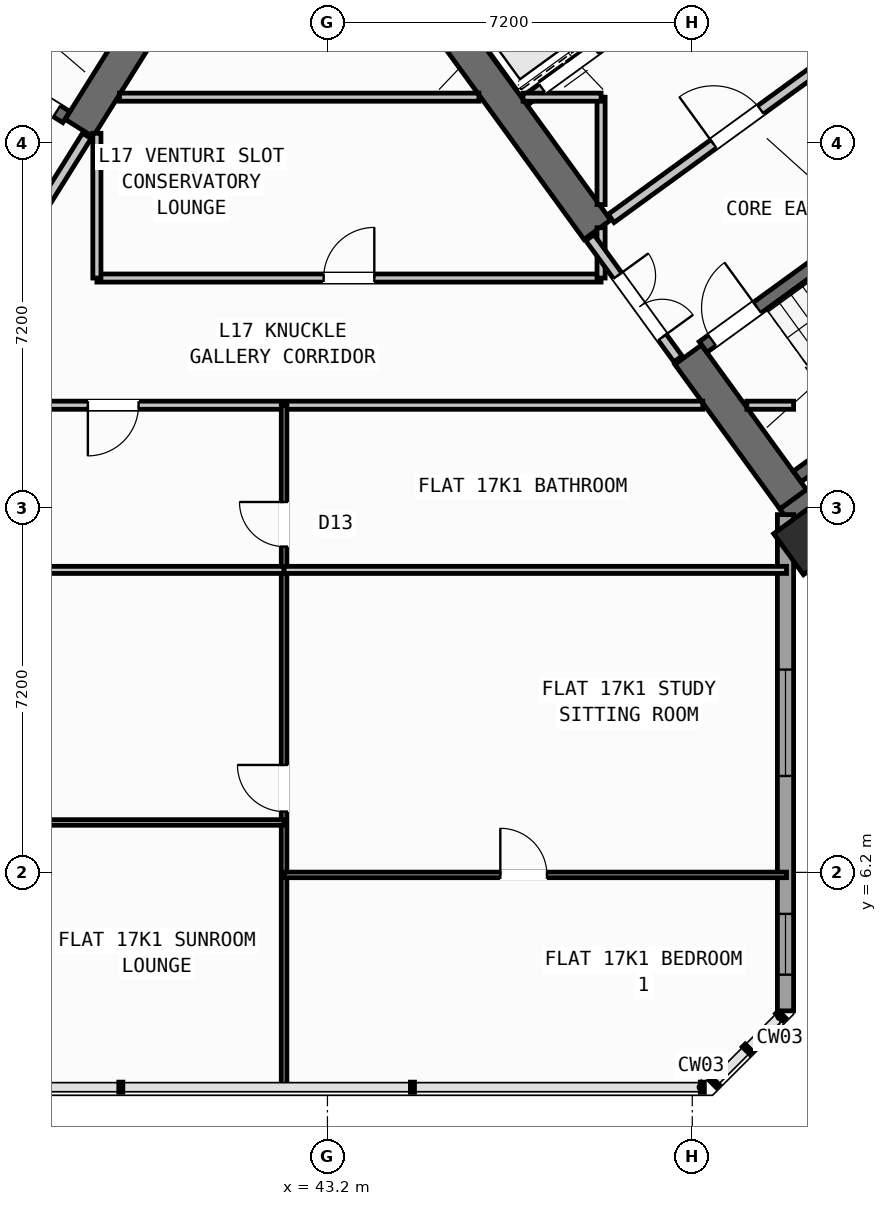
"""IFC4 building model, lengths in metres.
Left out: names, types, materials, properties, quantities, classifications, styles, units other than length and angle.
Written with IfcOpenShell. Run it as: python <this file> out.ifc"""

import sys

from ifc_helpers import new_model, si_unit, direction, frame, frame_2d, origin, origin_2d, place, context, subcontext, project, spatial, rectangle, hollow_rectangle, extrude, source, transform, mapped, element, fill, save


model = new_model("IFC4")
c1 = context("Model", 3, precision=1e-05, world=origin(), true_north=direction((0.0, 1.0)))
c2 = subcontext(c1, "Body", "Model", "MODEL_VIEW")
j1 = project(units=[si_unit("LENGTHUNIT", "METRE"), si_unit("PLANEANGLEUNIT", "RADIAN")], contexts=[c1])
p1 = place(None, origin())
s1 = spatial("IfcSite", under=j1, at=p1, CompositionType="ELEMENT")
p2 = place(p1, origin())
s2 = spatial("IfcBuilding", under=s1, at=p2, CompositionType="ELEMENT")
p3 = place(p2, frame((0.0, 0.0, 67.2)))
s3 = spatial("IfcBuildingStorey", under=s2, at=p3, CompositionType="ELEMENT", Elevation=67.2)
p4 = place(p3, frame((40.168, 23.88, 0.0), z_axis=(0.0, 0.0, 1.0), x_axis=(-0.529893103397, -0.8480644427, 0.0)))
e1 = element("IfcWall", 1, at=p4, inside=s3, PredefinedType="SHEAR", context=c2, shape_type="SweptSolid", body=[
    extrude(rectangle(XDim=3.525, YDim=0.65, at=frame_2d((1.763, 0.0))), origin(), (0.0, 0.0, 1.0), 4.22),
])
p5 = place(p3, frame((52.318, 13.11, 0.0), z_axis=(0.0, 0.0, 1.0), x_axis=(0.809019445368, 0.587781878776, 0.0)))
e2 = element("IfcWall", 2, at=p5, inside=s3, PredefinedType="SHEAR", context=c2, shape_type="SweptSolid", body=[
    extrude(rectangle(XDim=12.44, YDim=0.65, at=frame_2d((6.22, 0.0))), origin(), (0.0, 0.0, 1.0), 4.22),
])
p6 = place(p3, frame((52.39, 13.564, 0.0), z_axis=(0.0, 0.0, 1.0), x_axis=(-0.58779688989, 0.809008539037, 0.0)))
e3 = element("IfcWall", 3, at=p6, inside=s3, PredefinedType="SHEAR", context=c2, shape_type="SweptSolid", body=[
    extrude(rectangle(XDim=3.525, YDim=0.65, at=frame_2d((1.763, 0.0))), origin(), (0.0, 0.0, 1.0), 4.22),
])
p7 = place(p3, frame((48.526, 18.884, 0.0), z_axis=(0.0, 0.0, 1.0), x_axis=(-0.58777996584, 0.809020835181, 0.0)))
e4 = element("IfcWall", 4, at=p7, inside=s3, PredefinedType="SHEAR", context=c2, shape_type="SweptSolid", body=[
    extrude(rectangle(XDim=6.375, YDim=0.65, at=frame_2d((3.188, 0.0))), origin(), (0.0, 0.0, 1.0), 4.22),
])
m1 = source(origin(), c2, "Body", "SweptSolid", [
    extrude(hollow_rectangle(XDim=1.0, YDim=1.0, WallThickness=0.04, at=origin_2d()), origin(), (0.0, 0.0, 1.0), 4.5),
])
p8 = place(p3, frame((52.705, 12.773, 0.0), z_axis=(0.0, 0.0, 1.0), x_axis=(0.809016994375, 0.587785252292, 0.0)))
e5 = element("IfcColumn", 5, at=p8, inside=s3, PredefinedType="COLUMN", context=c2, shape_type="MappedRepresentation", body=[
    mapped(m1, transform((0.0, 0.0, 0.0), scale=1.0)),
])
p9 = place(p3, frame((56.581, 7.439, 0.0), z_axis=(0.0, 0.0, 1.0), x_axis=(-0.587785875463, 0.809016541614, 0.0)))
e6 = element("IfcWall", 6, at=p9, inside=s3, PredefinedType="STANDARD", context=c2, shape_type="SweptSolid", body=[
    extrude(rectangle(XDim=6.774, YDim=0.32, at=frame_2d((3.387, 0.0))), origin(), (0.0, 0.0, 1.0), 4.22),
])
p10 = place(p9, frame((1.556, 0.0, 0.8)))
e7 = element("IfcOpeningElement", 7, at=p10, cuts=e6, PredefinedType="OPENING", context=c2, shape_type="SweptSolid", body=[
    extrude(rectangle(XDim=2.1, YDim=1.55, at=frame_2d((1.05, 0.775))), frame((0.0, 0.17, 0.0), z_axis=(0.0, -1.0, 0.0), x_axis=(1.0, 0.0, 0.0)), (0.0, 0.0, 1.0), 0.34),
])
p11 = place(p3, frame((52.24, 13.261, 0.0), z_axis=(0.0, 0.0, 1.0), x_axis=(0.0, -1.0, 0.0)))
e8 = element("IfcWall", 8, at=p11, inside=s3, PredefinedType="STANDARD", context=c2, shape_type="SweptSolid", body=[
    extrude(rectangle(XDim=9.795, YDim=0.32, at=frame_2d((4.897, 0.0))), origin(), (0.0, 0.0, 1.0), 4.22),
])
p12 = place(p11, frame((3.058, 0.0, 0.8)))
e9 = element("IfcOpeningElement", 9, at=p12, cuts=e8, PredefinedType="OPENING", context=c2, shape_type="SweptSolid", body=[
    extrude(rectangle(XDim=2.1, YDim=1.55, at=frame_2d((1.05, 0.775))), frame((0.0, 0.17, 0.0), z_axis=(0.0, -1.0, 0.0), x_axis=(1.0, 0.0, 0.0)), (0.0, 0.0, 1.0), 0.34),
])
p13 = place(p11, frame((7.88, 0.0, 0.95)))
e10 = element("IfcOpeningElement", 10, at=p13, cuts=e8, PredefinedType="OPENING", context=c2, shape_type="SweptSolid", body=[
    extrude(rectangle(XDim=1.2, YDim=1.4, at=frame_2d((0.6, 0.7))), frame((0.0, 0.17, 0.0), z_axis=(0.0, -1.0, 0.0), x_axis=(1.0, 0.0, 0.0)), (0.0, 0.0, 1.0), 0.34),
])
p14 = place(p3, frame((38.046, 21.108, 0.0), z_axis=(0.0, 0.0, 1.0), x_axis=(-0.848054434086, 0.529909121291, 0.0)))
e11 = element("IfcWall", 11, at=p14, inside=s3, PredefinedType="SHEAR", context=c2, shape_type="SweptSolid", body=[
    extrude(rectangle(XDim=7.33, YDim=0.26, at=frame_2d((3.665, 0.0))), origin(), (0.0, 0.0, 1.0), 4.22),
])
p15 = place(p14, frame((0.22, 0.0, 0.0)))
e12 = element("IfcOpeningElement", 12, at=p15, cuts=e11, PredefinedType="OPENING", context=c2, shape_type="SweptSolid", body=[
    extrude(rectangle(XDim=1.1, YDim=2.1, at=frame_2d((0.55, 1.05))), frame((0.0, 0.14, 0.0), z_axis=(0.0, -1.0, 0.0), x_axis=(1.0, 0.0, 0.0)), (0.0, 0.0, 1.0), 0.28),
])
p16 = place(p3, frame((52.472, 14.013, 0.0), z_axis=(0.0, 0.0, 1.0), x_axis=(0.809028366311, 0.587769599847, 0.0)))
e13 = element("IfcWall", 13, at=p16, inside=s3, PredefinedType="SHEAR", context=c2, shape_type="SweptSolid", body=[
    extrude(rectangle(XDim=7.33, YDim=0.26, at=frame_2d((3.665, 0.0))), origin(), (0.0, 0.0, 1.0), 4.22),
])
p17 = place(p3, frame((50.615, 16.57, 0.0), z_axis=(0.0, 0.0, 1.0), x_axis=(0.809028366311, 0.587769599847, 0.0)))
e14 = element("IfcWall", 14, at=p17, inside=s3, PredefinedType="SHEAR", context=c2, shape_type="SweptSolid", body=[
    extrude(rectangle(XDim=7.33, YDim=0.26, at=frame_2d((3.665, 0.0))), origin(), (0.0, 0.0, 1.0), 4.22),
])
p18 = place(p17, frame((0.22, 0.0, 0.0)))
e15 = element("IfcOpeningElement", 15, at=p18, cuts=e14, PredefinedType="OPENING", context=c2, shape_type="SweptSolid", body=[
    extrude(rectangle(XDim=1.1, YDim=2.1, at=frame_2d((0.55, 1.05))), frame((0.0, 0.14, 0.0), z_axis=(0.0, -1.0, 0.0), x_axis=(1.0, 0.0, 0.0)), (0.0, 0.0, 1.0), 0.28),
])
p19 = place(p3, frame((47.106, 21.437, 0.0), z_axis=(0.0, 0.0, 1.0), x_axis=(0.809012514015, 0.58779141893, 0.0)))
e16 = element("IfcWall", 16, at=p19, inside=s3, PredefinedType="STANDARD", context=c2, shape_type="SweptSolid", body=[
    extrude(rectangle(XDim=3.398, YDim=0.2, at=frame_2d((1.699, 0.0))), origin(), (0.0, 0.0, 1.0), 4.21),
])
p20 = place(p19, frame((0.408, 0.0, 0.0)))
e17 = element("IfcOpeningElement", 17, at=p20, cuts=e16, PredefinedType="OPENING", context=c2, shape_type="SweptSolid", body=[
    extrude(rectangle(XDim=1.3, YDim=2.2, at=frame_2d((0.65, 1.1))), frame((0.0, 0.11, 0.0), z_axis=(0.0, -1.0, 0.0), x_axis=(1.0, 0.0, 0.0)), (0.0, 0.0, 1.0), 0.22),
])
p21 = place(p3, frame((48.799, 19.107, 0.0), z_axis=(0.0, 0.0, 1.0), x_axis=(0.809012959416, 0.587790805897, 0.0)))
e18 = element("IfcWall", 18, at=p21, inside=s3, PredefinedType="STANDARD", context=c2, shape_type="SweptSolid", body=[
    extrude(rectangle(XDim=5.718, YDim=0.2, at=frame_2d((2.859, 0.0))), origin(), (0.0, 0.0, 1.0), 4.21),
])
p22 = place(p21, frame((2.498, 0.0, 0.0)))
e19 = element("IfcOpeningElement", 19, at=p22, cuts=e18, PredefinedType="OPENING", context=c2, shape_type="SweptSolid", body=[
    extrude(rectangle(XDim=1.15, YDim=2.1, at=frame_2d((0.575, 1.05))), frame((0.0, 0.11, 0.0), z_axis=(0.0, -1.0, 0.0), x_axis=(1.0, 0.0, 0.0)), (0.0, 0.0, 1.0), 0.22),
])
p23 = place(p3, frame((38.451, 20.737, 0.0), z_axis=(0.0, 0.0, 1.0), x_axis=(-0.529924799939, -0.848044637038, 0.0)))
e20 = element("IfcWall", 20, at=p23, inside=s3, PredefinedType="STANDARD", context=c2, shape_type="SweptSolid", body=[
    extrude(rectangle(XDim=2.96, YDim=0.2, at=frame_2d((1.48, 0.0))), origin(), (0.0, 0.0, 1.0), 2.395),
])
p24 = place(p23, frame((1.46, 0.0, 0.0)))
e21 = element("IfcOpeningElement", 21, at=p24, cuts=e20, PredefinedType="OPENING", context=c2, shape_type="SweptSolid", body=[
    extrude(rectangle(XDim=0.86, YDim=2.05, at=frame_2d((0.43, 1.025))), frame((0.0, 0.11, 0.0), z_axis=(0.0, -1.0, 0.0), x_axis=(1.0, 0.0, 0.0)), (0.0, 0.0, 1.0), 0.22),
])
p25 = place(p3, frame((35.296, 15.42, 0.0), z_axis=(0.0, 0.0, 1.0), x_axis=(1.0, 0.0, 0.0)))
e22 = element("IfcWall", 22, at=p25, inside=s3, PredefinedType="PARTITIONING", context=c2, shape_type="SweptSolid", body=[
    extrude(rectangle(XDim=15.311, YDim=0.16, at=frame_2d((7.655, 0.0))), origin(), (0.0, 0.0, 1.0), 4.21),
])
p26 = place(p25, frame((3.176, 0.0, 0.0)))
e23 = element("IfcOpeningElement", 23, at=p26, cuts=e22, PredefinedType="OPENING", context=c2, shape_type="SweptSolid", body=[
    extrude(rectangle(XDim=1.0, YDim=2.1, at=frame_2d((0.5, 1.05))), frame((0.0, 0.09, 0.0), z_axis=(0.0, -1.0, 0.0), x_axis=(1.0, 0.0, 0.0)), (0.0, 0.0, 1.0), 0.18),
])
p27 = place(p3, frame((51.477, 15.42, 0.0), z_axis=(0.0, 0.0, 1.0), x_axis=(1.0, 0.0, 0.0)))
e24 = element("IfcWall", 24, at=p27, inside=s3, PredefinedType="PARTITIONING", context=c2, shape_type="SweptSolid", body=[
    extrude(rectangle(XDim=0.923, YDim=0.16, at=frame_2d((0.461, 0.0))), origin(), (0.0, 0.0, 1.0), 4.21),
])
p28 = place(p3, frame((38.65, 17.93, 0.0), z_axis=(0.0, 0.0, 1.0), x_axis=(1.0, 0.0, 0.0)))
e25 = element("IfcWall", 25, at=p28, inside=s3, PredefinedType="PARTITIONING", context=c2, shape_type="SweptSolid", body=[
    extrude(rectangle(XDim=9.95, YDim=0.16, at=frame_2d((4.975, 0.0))), origin(), (0.0, 0.0, 1.0), 4.21),
])
p29 = place(p28, frame((4.475, 0.0, 0.0)))
e26 = element("IfcOpeningElement", 26, at=p29, cuts=e25, PredefinedType="OPENING", context=c2, shape_type="SweptSolid", body=[
    extrude(rectangle(XDim=1.0, YDim=2.1, at=frame_2d((0.5, 1.05))), frame((0.0, 0.09, 0.0), z_axis=(0.0, -1.0, 0.0), x_axis=(1.0, 0.0, 0.0)), (0.0, 0.0, 1.0), 0.18),
])
p30 = place(p3, frame((38.65, 17.93, 0.0), z_axis=(0.0, 0.0, 1.0), x_axis=(0.0, 1.0, 0.0)))
e27 = element("IfcWall", 27, at=p30, inside=s3, PredefinedType="PARTITIONING", context=c2, shape_type="SweptSolid", body=[
    extrude(rectangle(XDim=2.857, YDim=0.16, at=frame_2d((1.428, 0.0))), origin(), (0.0, 0.0, 1.0), 4.21),
])
p31 = place(p3, frame((48.6, 17.93, 0.0), z_axis=(0.0, 0.0, 1.0), x_axis=(0.0, 1.0, 0.0)))
e28 = element("IfcWall", 28, at=p31, inside=s3, PredefinedType="PARTITIONING", context=c2, shape_type="SweptSolid", body=[
    extrude(rectangle(XDim=0.993, YDim=0.16, at=frame_2d((0.496, 0.0))), origin(), (0.0, 0.0, 1.0), 4.21),
])
p32 = place(p3, frame((48.6, 19.38, 0.0), z_axis=(0.0, 0.0, 1.0), x_axis=(0.0, 1.0, 0.0)))
e29 = element("IfcWall", 29, at=p32, inside=s3, PredefinedType="PARTITIONING", context=c2, shape_type="SweptSolid", body=[
    extrude(rectangle(XDim=2.12, YDim=0.16, at=frame_2d((1.06, 0.0))), origin(), (0.0, 0.0, 1.0), 4.21),
])
p33 = place(p3, frame((39.095, 21.5, 0.0), z_axis=(0.0, 0.0, 1.0), x_axis=(1.0, 0.0, 0.0)))
e30 = element("IfcWall", 30, at=p33, inside=s3, PredefinedType="PARTITIONING", context=c2, shape_type="SweptSolid", body=[
    extrude(rectangle(XDim=7.094, YDim=0.16, at=frame_2d((3.547, 0.0))), origin(), (0.0, 0.0, 1.0), 4.21),
])
p34 = place(p3, frame((47.06, 21.5, 0.0), z_axis=(0.0, 0.0, 1.0), x_axis=(1.0, 0.0, 0.0)))
e31 = element("IfcWall", 31, at=p34, inside=s3, PredefinedType="PARTITIONING", context=c2, shape_type="SweptSolid", body=[
    extrude(rectangle(XDim=1.54, YDim=0.16, at=frame_2d((0.77, 0.0))), origin(), (0.0, 0.0, 1.0), 4.21),
])
p35 = place(p3, frame((50.119, 16.333, 0.0), z_axis=(0.0, 0.0, 1.0), x_axis=(-0.587749856981, 0.809042709391, 0.0)))
e32 = element("IfcWall", 32, at=p35, inside=s3, PredefinedType="STANDARD", context=c2, shape_type="SweptSolid", body=[
    extrude(rectangle(XDim=2.96, YDim=0.2, at=frame_2d((1.48, 0.0))), origin(), (0.0, 0.0, 1.0), 2.395),
])
p36 = place(p35, frame((0.53, 0.0, 0.0)))
e33 = element("IfcOpeningElement", 33, at=p36, cuts=e32, PredefinedType="OPENING", context=c2, shape_type="SweptSolid", body=[
    extrude(rectangle(XDim=1.5, YDim=2.15, at=frame_2d((0.75, 1.075))), frame((0.0, 0.11, 0.0), z_axis=(0.0, -1.0, 0.0), x_axis=(1.0, 0.0, 0.0)), (0.0, 0.0, 1.0), 0.22),
])
p37 = place(p3, frame((42.344, 1.96, 0.0), z_axis=(0.0, 0.0, 1.0), x_axis=(0.0, 1.0, 0.0)))
e34 = element("IfcWall", 34, at=p37, inside=s3, PredefinedType="PARTITIONING", context=c2, shape_type="SweptSolid", body=[
    extrude(rectangle(XDim=13.46, YDim=0.11, at=frame_2d((6.73, 0.0))), origin(), (0.0, 0.0, 1.0), 4.21),
])
p38 = place(p37, frame((5.44, 0.0, 0.0)))
e35 = element("IfcOpeningElement", 35, at=p38, cuts=e34, PredefinedType="OPENING", context=c2, shape_type="SweptSolid", body=[
    extrude(rectangle(XDim=0.92, YDim=2.08, at=frame_2d((0.46, 1.04))), frame((0.0, 0.065, 0.0), z_axis=(0.0, -1.0, 0.0), x_axis=(1.0, 0.0, 0.0)), (0.0, 0.0, 1.0), 0.13),
])
p39 = place(p37, frame((10.67, 0.0, 0.0)))
e36 = element("IfcOpeningElement", 36, at=p39, cuts=e34, PredefinedType="OPENING", context=c2, shape_type="SweptSolid", body=[
    extrude(rectangle(XDim=0.88, YDim=2.08, at=frame_2d((0.44, 1.04))), frame((0.0, 0.065, 0.0), z_axis=(0.0, -1.0, 0.0), x_axis=(1.0, 0.0, 0.0)), (0.0, 0.0, 1.0), 0.13),
])
p40 = place(p3, frame((33.702, 12.17, 0.0), z_axis=(0.0, 0.0, 1.0), x_axis=(1.0, 0.0, 0.0)))
e37 = element("IfcWall", 37, at=p40, inside=s3, PredefinedType="PLUMBINGWALL", context=c2, shape_type="SweptSolid", body=[
    extrude(rectangle(XDim=8.642, YDim=0.14, at=frame_2d((4.321, 0.0))), origin(), (0.0, 0.0, 1.0), 3.395),
])
p41 = place(p40, frame((3.06, 0.0, 0.0)))
e38 = element("IfcOpeningElement", 38, at=p41, cuts=e37, PredefinedType="OPENING", context=c2, shape_type="SweptSolid", body=[
    extrude(rectangle(XDim=0.92, YDim=2.08, at=frame_2d((0.46, 1.04))), frame((0.0, 0.08, 0.0), z_axis=(0.0, -1.0, 0.0), x_axis=(1.0, 0.0, 0.0)), (0.0, 0.0, 1.0), 0.16),
])
p42 = place(p3, frame((42.344, 12.17, 0.0), z_axis=(0.0, 0.0, 1.0), x_axis=(1.0, 0.0, 0.0)))
e39 = element("IfcWall", 39, at=p42, inside=s3, PredefinedType="PLUMBINGWALL", context=c2, shape_type="SweptSolid", body=[
    extrude(rectangle(XDim=9.916, YDim=0.14, at=frame_2d((4.958, 0.0))), origin(), (0.0, 0.0, 1.0), 3.395),
])
p43 = place(p3, frame((31.74, 7.185, 0.0), z_axis=(0.0, 0.0, 1.0), x_axis=(1.0, 0.0, 0.0)))
e40 = element("IfcWall", 40, at=p43, inside=s3, PredefinedType="PARTITIONING", context=c2, shape_type="SweptSolid", body=[
    extrude(rectangle(XDim=10.604, YDim=0.11, at=frame_2d((5.302, 0.0))), origin(), (0.0, 0.0, 1.0), 4.21),
])
p44 = place(p43, frame((5.022, 0.0, 0.0)))
e41 = element("IfcOpeningElement", 41, at=p44, cuts=e40, PredefinedType="OPENING", context=c2, shape_type="SweptSolid", body=[
    extrude(rectangle(XDim=0.92, YDim=2.08, at=frame_2d((0.46, 1.04))), frame((0.0, 0.065, 0.0), z_axis=(0.0, -1.0, 0.0), x_axis=(1.0, 0.0, 0.0)), (0.0, 0.0, 1.0), 0.13),
])
p45 = place(p3, frame((42.344, 6.15, 0.0), z_axis=(0.0, 0.0, 1.0), x_axis=(1.0, 0.0, 0.0)))
e42 = element("IfcWall", 42, at=p45, inside=s3, PredefinedType="PARTITIONING", context=c2, shape_type="SweptSolid", body=[
    extrude(rectangle(XDim=9.916, YDim=0.11, at=frame_2d((4.958, 0.0))), origin(), (0.0, 0.0, 1.0), 4.21),
])
p46 = place(p45, frame((4.268, 0.0, 0.0)))
e43 = element("IfcOpeningElement", 43, at=p46, cuts=e42, PredefinedType="OPENING", context=c2, shape_type="SweptSolid", body=[
    extrude(rectangle(XDim=0.92, YDim=2.08, at=frame_2d((0.46, 1.04))), frame((0.0, 0.065, 0.0), z_axis=(0.0, -1.0, 0.0), x_axis=(1.0, 0.0, 0.0)), (0.0, 0.0, 1.0), 0.13),
])
m2 = source(origin(), c2, "Body", "SweptSolid", [
    extrude(rectangle(XDim=2.1, YDim=1.55, at=frame_2d((1.05, 0.775))), frame((0.0, 0.03, 0.0), z_axis=(0.0, -1.0, 0.0), x_axis=(1.0, 0.0, 0.0)), (0.0, 0.0, 1.0), 0.06),
])
p47 = place(p12, origin())
e44 = element("IfcWindow", 44, at=p47, inside=s3, PartitioningType="SINGLE_PANEL", PredefinedType="WINDOW", context=c2, shape_type="MappedRepresentation", body=[
    mapped(m2, transform((0.0, 0.0, 0.0), scale=1.0)),
])
fill(e9, e44)
m3 = source(origin(), c2, "Body", "SweptSolid", [
    extrude(rectangle(XDim=1.2, YDim=1.4, at=frame_2d((0.6, 0.7))), frame((0.0, 0.03, 0.0), z_axis=(0.0, -1.0, 0.0), x_axis=(1.0, 0.0, 0.0)), (0.0, 0.0, 1.0), 0.06),
])
p48 = place(p13, origin())
e45 = element("IfcWindow", 45, at=p48, inside=s3, PartitioningType="SINGLE_PANEL", PredefinedType="WINDOW", context=c2, shape_type="MappedRepresentation", body=[
    mapped(m3, transform((0.0, 0.0, 0.0), scale=1.0)),
])
fill(e10, e45)
m4 = source(origin(), c2, "Body", "SweptSolid", [
    extrude(rectangle(XDim=1.1, YDim=2.1, at=frame_2d((0.55, 1.05))), frame((0.0, 0.025, 0.0), z_axis=(0.0, -1.0, 0.0), x_axis=(1.0, 0.0, 0.0)), (0.0, 0.0, 1.0), 0.05),
])
p49 = place(p15, origin())
e46 = element("IfcDoor", 46, at=p49, inside=s3, OperationType="SINGLE_SWING_RIGHT", PredefinedType="DOOR", context=c2, shape_type="MappedRepresentation", body=[
    mapped(m4, transform((0.0, 0.0, 0.0), scale=1.0)),
])
fill(e12, e46)
p50 = place(p18, origin())
e47 = element("IfcDoor", 47, at=p50, inside=s3, OperationType="SINGLE_SWING_RIGHT", PredefinedType="DOOR", context=c2, shape_type="MappedRepresentation", body=[
    mapped(m4, transform((0.0, 0.0, 0.0), scale=1.0)),
])
fill(e15, e47)
m5 = source(origin(), c2, "Body", "SweptSolid", [
    extrude(rectangle(XDim=1.15, YDim=2.1, at=frame_2d((0.575, 1.05))), frame((0.0, 0.025, 0.0), z_axis=(0.0, -1.0, 0.0), x_axis=(1.0, 0.0, 0.0)), (0.0, 0.0, 1.0), 0.05),
])
p51 = place(p22, origin())
e48 = element("IfcDoor", 48, at=p51, inside=s3, OperationType="SINGLE_SWING_LEFT", PredefinedType="DOOR", context=c2, shape_type="MappedRepresentation", body=[
    mapped(m5, transform((0.0, 0.0, 0.0), scale=1.0)),
])
fill(e19, e48)
m6 = source(origin(), c2, "Body", "SweptSolid", [
    extrude(rectangle(XDim=1.3, YDim=2.2, at=frame_2d((0.65, 1.1))), frame((0.0, 0.025, 0.0), z_axis=(0.0, -1.0, 0.0), x_axis=(1.0, 0.0, 0.0)), (0.0, 0.0, 1.0), 0.05),
])
p52 = place(p20, origin())
e49 = element("IfcDoor", 49, at=p52, inside=s3, OperationType="DOUBLE_DOOR_SLIDING", PredefinedType="DOOR", context=c2, shape_type="MappedRepresentation", body=[
    mapped(m6, transform((0.0, 0.0, 0.0), scale=1.0)),
])
fill(e17, e49)
m7 = source(origin(), c2, "Body", "SweptSolid", [
    extrude(rectangle(XDim=1.0, YDim=2.1, at=frame_2d((0.5, 1.05))), frame((0.0, 0.025, 0.0), z_axis=(0.0, -1.0, 0.0), x_axis=(1.0, 0.0, 0.0)), (0.0, 0.0, 1.0), 0.05),
])
p53 = place(p29, origin())
e50 = element("IfcDoor", 50, at=p53, inside=s3, OperationType="SINGLE_SWING_RIGHT", PredefinedType="DOOR", context=c2, shape_type="MappedRepresentation", body=[
    mapped(m7, transform((0.0, 0.0, 0.0), scale=1.0)),
])
fill(e26, e50)
m8 = source(origin(), c2, "Body", "SweptSolid", [
    extrude(rectangle(XDim=1.5, YDim=2.15, at=frame_2d((0.75, 1.075))), frame((0.0, 0.025, 0.0), z_axis=(0.0, -1.0, 0.0), x_axis=(1.0, 0.0, 0.0)), (0.0, 0.0, 1.0), 0.05),
])
p54 = place(p36, frame((1.5, 0.0, 0.0), z_axis=(0.0, 0.0, 1.0), x_axis=(-1.0, 0.0, 0.0)))
e51 = element("IfcDoor", 51, at=p54, inside=s3, OperationType="DOUBLE_DOOR_SINGLE_SWING", PredefinedType="DOOR", context=c2, shape_type="MappedRepresentation", body=[
    mapped(m8, transform((0.0, 0.0, 0.0), scale=1.0)),
])
fill(e33, e51)
m9 = source(origin(), c2, "Body", "SweptSolid", [
    extrude(rectangle(XDim=0.92, YDim=2.08, at=frame_2d((0.46, 1.04))), frame((0.0, 0.025, 0.0), z_axis=(0.0, -1.0, 0.0), x_axis=(1.0, 0.0, 0.0)), (0.0, 0.0, 1.0), 0.05),
])
p55 = place(p38, origin())
e52 = element("IfcDoor", 52, at=p55, inside=s3, OperationType="SINGLE_SWING_RIGHT", PredefinedType="DOOR", context=c2, shape_type="MappedRepresentation", body=[
    mapped(m9, transform((0.0, 0.0, 0.0), scale=1.0)),
])
fill(e35, e52)
p56 = place(p46, origin())
e53 = element("IfcDoor", 53, at=p56, inside=s3, OperationType="SINGLE_SWING_LEFT", PredefinedType="DOOR", context=c2, shape_type="MappedRepresentation", body=[
    mapped(m9, transform((0.0, 0.0, 0.0), scale=1.0)),
])
fill(e43, e53)
p57 = place(p26, frame((1.0, 0.0, 0.0), z_axis=(0.0, 0.0, 1.0), x_axis=(-1.0, 0.0, 0.0)))
e54 = element("IfcDoor", 54, at=p57, inside=s3, OperationType="SINGLE_SWING_RIGHT", PredefinedType="DOOR", context=c2, shape_type="MappedRepresentation", body=[
    mapped(m7, transform((0.0, 0.0, 0.0), scale=1.0)),
])
fill(e23, e54)
m10 = source(origin(), c2, "Body", "SweptSolid", [
    extrude(rectangle(XDim=0.88, YDim=2.08, at=frame_2d((0.44, 1.04))), frame((0.0, 0.025, 0.0), z_axis=(0.0, -1.0, 0.0), x_axis=(1.0, 0.0, 0.0)), (0.0, 0.0, 1.0), 0.05),
])
p58 = place(p39, origin())
e55 = element("IfcDoor", 55, at=p58, inside=s3, OperationType="SINGLE_SWING_RIGHT", PredefinedType="DOOR", context=c2, shape_type="MappedRepresentation", body=[
    mapped(m10, transform((0.0, 0.0, 0.0), scale=1.0)),
])
fill(e36, e55)
save(model, sys.argv[1])
